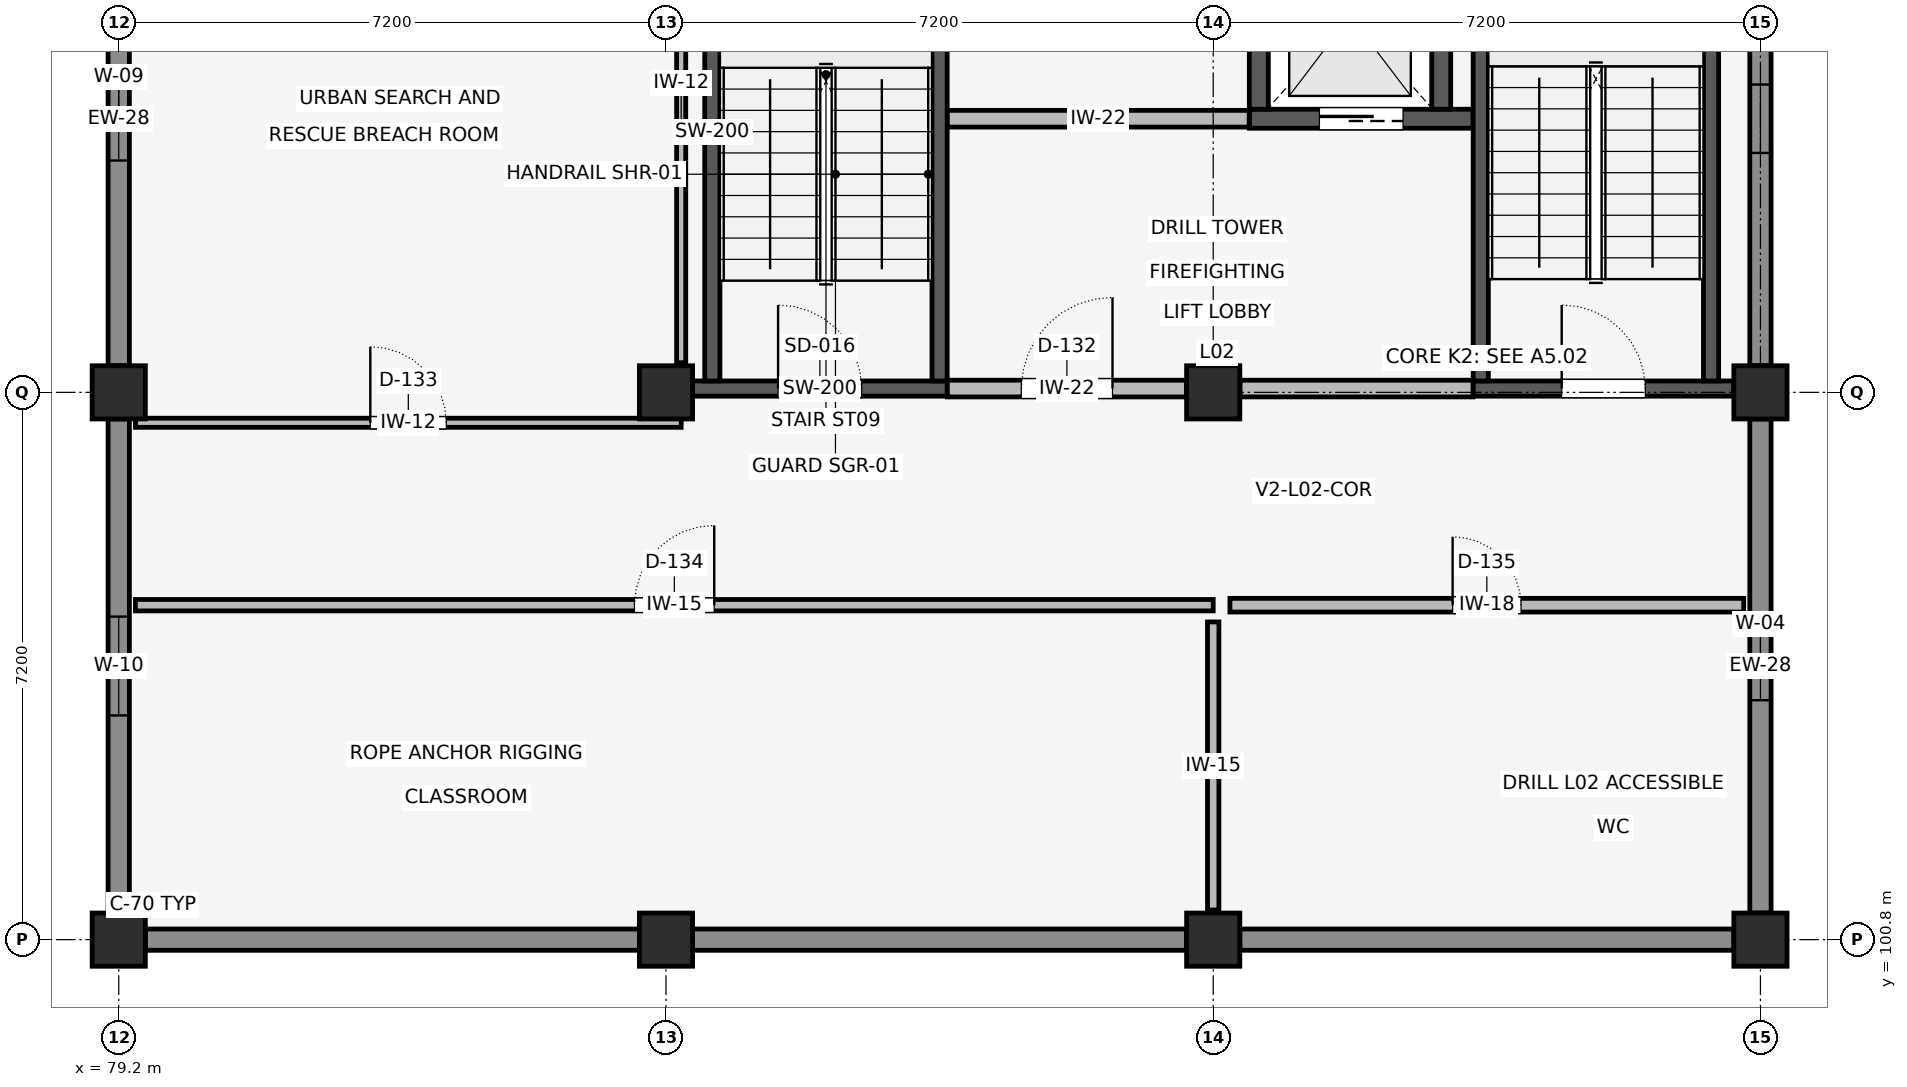
"""IFC4 building model, lengths in metres.
Left out: names, types, materials, properties, quantities, classifications, styles, units other than length and angle.
Written with IfcOpenShell. Run it as: python <this file> out.ifc"""

import sys

from ifc_helpers import new_model, si_unit, direction, frame, frame_2d, origin, origin_2d, place, context, subcontext, project, spatial, rectangle, extrude, element, fill, save


model = new_model("IFC4")
c1 = context("Model", 3, precision=1e-05, world=origin(), true_north=direction((0.0, 1.0)))
c2 = subcontext(c1, "Body", "Model", "MODEL_VIEW")
j1 = project(units=[si_unit("LENGTHUNIT", "METRE"), si_unit("PLANEANGLEUNIT", "RADIAN")], contexts=[c1])
p1 = place(None, origin())
s1 = spatial("IfcSite", under=j1, at=p1, CompositionType="ELEMENT")
p2 = place(p1, origin())
s2 = spatial("IfcBuilding", under=s1, at=p2, CompositionType="ELEMENT")
p3 = place(p2, frame((0.0, 0.0, 9.6)))
s3 = spatial("IfcBuildingStorey", under=s2, at=p3, CompositionType="ELEMENT", Elevation=9.6)
for number, where, z_axis, x_axis in (
    (1, (79.2, 100.8, 0.0), (0.0, 0.0, 1.0), (1.0, 0.0, 0.0)),
    (2, (79.2, 108.0, 0.0), (0.0, 0.0, 1.0), (1.0, 0.0, 0.0)),
    (3, (86.4, 100.8, 0.0), (0.0, 0.0, 1.0), (1.0, 0.0, 0.0)),
    (4, (86.4, 108.0, 0.0), (0.0, 0.0, 1.0), (1.0, 0.0, 0.0)),
    (5, (93.6, 100.8, 0.0), (0.0, 0.0, 1.0), (1.0, 0.0, 0.0)),
    (6, (93.6, 108.0, 0.0), (0.0, 0.0, 1.0), (1.0, 0.0, 0.0)),
    (7, (100.8, 100.8, 0.0), (0.0, 0.0, 1.0), (1.0, 0.0, 0.0)),
    (8, (100.8, 108.0, 0.0), (0.0, 0.0, 1.0), (1.0, 0.0, 0.0)),
):
    element("IfcColumn", number, at=place(p3, frame(where, z_axis=z_axis, x_axis=x_axis)), inside=s3, PredefinedType="COLUMN", context=c2, shape_type="SweptSolid", body=[
        extrude(rectangle(XDim=0.7, YDim=0.7, at=origin_2d()), origin(), (0.0, 0.0, 1.0), 3.9),
    ])
p4 = place(p3, frame((94.075, 111.6, 0.0), z_axis=(0.0, 0.0, 1.0), x_axis=(1.0, 0.0, 0.0)))
e9 = element("IfcWall", 9, at=p4, inside=s3, PredefinedType="SHEAR", context=c2, shape_type="SweptSolid", body=[
    extrude(rectangle(XDim=2.945, YDim=0.25, at=frame_2d((1.473, 0.0))), origin(), (0.0, 0.0, 1.0), 3.65),
])
p5 = place(p4, frame((0.923, 0.0, 0.0)))
e10 = element("IfcOpeningElement", 10, at=p5, cuts=e9, PredefinedType="OPENING", context=c2, shape_type="SweptSolid", body=[
    extrude(rectangle(XDim=1.1, YDim=2.15, at=frame_2d((0.55, 1.075))), frame((0.0, 0.137, 0.0), z_axis=(0.0, -1.0, 0.0), x_axis=(1.0, 0.0, 0.0)), (0.0, 0.0, 1.0), 0.274),
])
for number, where, z_axis, x_axis in (
    (11, (94.2, 111.725, 0.0), (0.0, 0.0, 1.0), (0.0, 1.0, 0.0)),
    (12, (96.6, 111.725, 0.0), (0.0, 0.0, 1.0), (0.0, 1.0, 0.0)),
):
    element("IfcWall", number, at=place(p3, frame(where, z_axis=z_axis, x_axis=x_axis)), inside=s3, PredefinedType="SHEAR", context=c2, shape_type="SweptSolid", body=[
        extrude(rectangle(XDim=2.45, YDim=0.25, at=frame_2d((1.225, 0.0))), origin(), (0.0, 0.0, 1.0), 3.65),
    ])
p6 = place(p3, frame((97.02, 108.05, 0.0), z_axis=(0.0, 0.0, 1.0), x_axis=(1.0, 0.0, 0.0)))
e13 = element("IfcWall", 13, at=p6, inside=s3, PredefinedType="SHEAR", context=c2, shape_type="SweptSolid", body=[
    extrude(rectangle(XDim=3.43, YDim=0.2, at=frame_2d((1.715, 0.0))), origin(), (0.0, 0.0, 1.0), 3.65),
])
p7 = place(p6, frame((1.165, 0.0, 0.0)))
e14 = element("IfcOpeningElement", 14, at=p7, cuts=e13, PredefinedType="OPENING", context=c2, shape_type="SweptSolid", body=[
    extrude(rectangle(XDim=1.1, YDim=2.15, at=frame_2d((0.55, 1.075))), frame((0.0, 0.112, 0.0), z_axis=(0.0, -1.0, 0.0), x_axis=(1.0, 0.0, 0.0)), (0.0, 0.0, 1.0), 0.224),
])
for number, where, z_axis, x_axis in (
    (15, (97.12, 108.15, 0.0), (0.0, 0.0, 1.0), (0.0, 1.0, 0.0)),
    (16, (100.15, 108.15, 0.0), (0.0, 0.0, 1.0), (0.0, 1.0, 0.0)),
):
    element("IfcWall", number, at=place(p3, frame(where, z_axis=z_axis, x_axis=x_axis)), inside=s3, PredefinedType="SHEAR", context=c2, shape_type="SweptSolid", body=[
        extrude(rectangle(XDim=6.6, YDim=0.2, at=frame_2d((3.3, 0.0))), origin(), (0.0, 0.0, 1.0), 3.65),
    ])
p8 = place(p3, frame((86.75, 108.05, 0.0), z_axis=(0.0, 0.0, 1.0), x_axis=(1.0, 0.0, 0.0)))
e17 = element("IfcWall", 17, at=p8, inside=s3, PredefinedType="SHEAR", context=c2, shape_type="SweptSolid", body=[
    extrude(rectangle(XDim=3.35, YDim=0.2, at=frame_2d((1.675, 0.0))), origin(), (0.0, 0.0, 1.0), 3.65),
])
p9 = place(p8, frame((1.125, 0.0, 0.0)))
e18 = element("IfcOpeningElement", 18, at=p9, cuts=e17, PredefinedType="OPENING", context=c2, shape_type="SweptSolid", body=[
    extrude(rectangle(XDim=1.1, YDim=2.15, at=frame_2d((0.55, 1.075))), frame((0.0, 0.112, 0.0), z_axis=(0.0, -1.0, 0.0), x_axis=(1.0, 0.0, 0.0)), (0.0, 0.0, 1.0), 0.224),
])
for number, where, z_axis, x_axis in (
    (19, (87.01, 108.15, 0.0), (0.0, 0.0, 1.0), (0.0, 1.0, 0.0)),
    (20, (90.0, 108.15, 0.0), (0.0, 0.0, 1.0), (0.0, 1.0, 0.0)),
):
    element("IfcWall", number, at=place(p3, frame(where, z_axis=z_axis, x_axis=x_axis)), inside=s3, PredefinedType="SHEAR", context=c2, shape_type="SweptSolid", body=[
        extrude(rectangle(XDim=6.56, YDim=0.2, at=frame_2d((3.28, 0.0))), origin(), (0.0, 0.0, 1.0), 3.65),
    ])
p10 = place(p3, frame((100.8, 101.15, 0.0), z_axis=(0.0, 0.0, 1.0), x_axis=(0.0, 1.0, 0.0)))
e21 = element("IfcWall", 21, at=p10, inside=s3, PredefinedType="ELEMENTEDWALL", context=c2, shape_type="SweptSolid", body=[
    extrude(rectangle(XDim=6.5, YDim=0.28, at=frame_2d((3.25, 0.0))), origin(), (0.0, 0.0, 1.0), 2.99),
])
p11 = place(p10, frame((2.8, 0.0, 0.8)))
e22 = element("IfcOpeningElement", 22, at=p11, cuts=e21, PredefinedType="OPENING", context=c2, shape_type="SweptSolid", body=[
    extrude(rectangle(XDim=0.9, YDim=2.0, at=frame_2d((0.45, 1.0))), frame((0.0, 0.152, 0.0), z_axis=(0.0, -1.0, 0.0), x_axis=(1.0, 0.0, 0.0)), (0.0, 0.0, 1.0), 0.304),
])
p12 = place(p3, frame((100.8, 108.35, 0.0), z_axis=(0.0, 0.0, 1.0), x_axis=(0.0, 1.0, 0.0)))
e23 = element("IfcWall", 23, at=p12, inside=s3, PredefinedType="ELEMENTEDWALL", context=c2, shape_type="SweptSolid", body=[
    extrude(rectangle(XDim=6.5, YDim=0.28, at=frame_2d((3.25, 0.0))), origin(), (0.0, 0.0, 1.0), 3.04),
])
p13 = place(p12, frame((2.8, 0.0, 0.8)))
e24 = element("IfcOpeningElement", 24, at=p13, cuts=e23, PredefinedType="OPENING", context=c2, shape_type="SweptSolid", body=[
    extrude(rectangle(XDim=0.9, YDim=2.0, at=frame_2d((0.45, 1.0))), frame((0.0, 0.152, 0.0), z_axis=(0.0, -1.0, 0.0), x_axis=(1.0, 0.0, 0.0)), (0.0, 0.0, 1.0), 0.304),
])
p14 = place(p3, frame((79.2, 114.85, 0.0), z_axis=(0.0, 0.0, 1.0), x_axis=(0.0, -1.0, 0.0)))
e25 = element("IfcWall", 25, at=p14, inside=s3, PredefinedType="ELEMENTEDWALL", context=c2, shape_type="SweptSolid", body=[
    extrude(rectangle(XDim=6.5, YDim=0.28, at=frame_2d((3.25, 0.0))), origin(), (0.0, 0.0, 1.0), 3.04),
])
p15 = place(p14, frame((2.7, 0.0, 0.85)))
e26 = element("IfcOpeningElement", 26, at=p15, cuts=e25, PredefinedType="OPENING", context=c2, shape_type="SweptSolid", body=[
    extrude(rectangle(XDim=1.1, YDim=1.75, at=frame_2d((0.55, 0.875))), frame((0.0, 0.152, 0.0), z_axis=(0.0, -1.0, 0.0), x_axis=(1.0, 0.0, 0.0)), (0.0, 0.0, 1.0), 0.304),
])
p16 = place(p3, frame((79.2, 107.65, 0.0), z_axis=(0.0, 0.0, 1.0), x_axis=(0.0, -1.0, 0.0)))
e27 = element("IfcWall", 27, at=p16, inside=s3, PredefinedType="ELEMENTEDWALL", context=c2, shape_type="SweptSolid", body=[
    extrude(rectangle(XDim=6.5, YDim=0.28, at=frame_2d((3.25, 0.0))), origin(), (0.0, 0.0, 1.0), 2.99),
])
p17 = place(p16, frame((2.6, 0.0, 0.85)))
e28 = element("IfcOpeningElement", 28, at=p17, cuts=e27, PredefinedType="OPENING", context=c2, shape_type="SweptSolid", body=[
    extrude(rectangle(XDim=1.3, YDim=1.85, at=frame_2d((0.65, 0.925))), frame((0.0, 0.152, 0.0), z_axis=(0.0, -1.0, 0.0), x_axis=(1.0, 0.0, 0.0)), (0.0, 0.0, 1.0), 0.304),
])
p18 = place(p3, frame((79.55, 100.8, 0.0), z_axis=(0.0, 0.0, 1.0), x_axis=(1.0, 0.0, 0.0)))
e29 = element("IfcWall", 29, at=p18, inside=s3, PredefinedType="ELEMENTEDWALL", context=c2, shape_type="SweptSolid", body=[
    extrude(rectangle(XDim=6.5, YDim=0.28, at=frame_2d((3.25, 0.0))), origin(), (0.0, 0.0, 1.0), 2.94),
])
p19 = place(p3, frame((86.75, 100.8, 0.0), z_axis=(0.0, 0.0, 1.0), x_axis=(1.0, 0.0, 0.0)))
e30 = element("IfcWall", 30, at=p19, inside=s3, PredefinedType="ELEMENTEDWALL", context=c2, shape_type="SweptSolid", body=[
    extrude(rectangle(XDim=6.5, YDim=0.28, at=frame_2d((3.25, 0.0))), origin(), (0.0, 0.0, 1.0), 2.89),
])
p20 = place(p3, frame((93.95, 100.8, 0.0), z_axis=(0.0, 0.0, 1.0), x_axis=(1.0, 0.0, 0.0)))
e31 = element("IfcWall", 31, at=p20, inside=s3, PredefinedType="ELEMENTEDWALL", context=c2, shape_type="SweptSolid", body=[
    extrude(rectangle(XDim=6.5, YDim=0.28, at=frame_2d((3.25, 0.0))), origin(), (0.0, 0.0, 1.0), 2.94),
])
p21 = place(p3, frame((90.102, 108.05, 0.0), z_axis=(0.0, 0.0, 1.0), x_axis=(1.0, 0.0, 0.0)))
e32 = element("IfcWall", 32, at=p21, inside=s3, PredefinedType="STANDARD", context=c2, shape_type="SweptSolid", body=[
    extrude(rectangle(XDim=3.146, YDim=0.22, at=frame_2d((1.573, 0.0))), origin(), (0.0, 0.0, 1.0), 3.62),
])
p22 = place(p21, frame((0.973, 0.0, 0.0)))
e33 = element("IfcOpeningElement", 33, at=p22, cuts=e32, PredefinedType="OPENING", context=c2, shape_type="SweptSolid", body=[
    extrude(rectangle(XDim=1.2, YDim=2.2, at=frame_2d((0.6, 1.1))), frame((0.0, 0.122, 0.0), z_axis=(0.0, -1.0, 0.0), x_axis=(1.0, 0.0, 0.0)), (0.0, 0.0, 1.0), 0.244),
])
p23 = place(p3, frame((93.952, 108.05, 0.0), z_axis=(0.0, 0.0, 1.0), x_axis=(1.0, 0.0, 0.0)))
e34 = element("IfcWall", 34, at=p23, inside=s3, PredefinedType="STANDARD", context=c2, shape_type="SweptSolid", body=[
    extrude(rectangle(XDim=3.066, YDim=0.22, at=frame_2d((1.533, 0.0))), origin(), (0.0, 0.0, 1.0), 3.62),
])
p24 = place(p3, frame((90.102, 111.6, 0.0), z_axis=(0.0, 0.0, 1.0), x_axis=(1.0, 0.0, 0.0)))
e35 = element("IfcWall", 35, at=p24, inside=s3, PredefinedType="STANDARD", context=c2, shape_type="SweptSolid", body=[
    extrude(rectangle(XDim=3.971, YDim=0.22, at=frame_2d((1.985, 0.0))), origin(), (0.0, 0.0, 1.0), 3.038),
])
p25 = place(p3, frame((79.42, 107.6, 0.0), z_axis=(0.0, 0.0, 1.0), x_axis=(1.0, 0.0, 0.0)))
e36 = element("IfcWall", 36, at=p25, inside=s3, PredefinedType="PARTITIONING", context=c2, shape_type="SweptSolid", body=[
    extrude(rectangle(XDim=7.18, YDim=0.12, at=frame_2d((3.59, 0.0))), origin(), (0.0, 0.0, 1.0), 2.988),
])
p26 = place(p25, frame((3.09, 0.0, 0.0)))
e37 = element("IfcOpeningElement", 37, at=p26, cuts=e36, PredefinedType="OPENING", context=c2, shape_type="SweptSolid", body=[
    extrude(rectangle(XDim=1.0, YDim=2.15, at=frame_2d((0.5, 1.075))), frame((0.0, 0.072, 0.0), z_axis=(0.0, -1.0, 0.0), x_axis=(1.0, 0.0, 0.0)), (0.0, 0.0, 1.0), 0.144),
])
p27 = place(p3, frame((86.6, 108.39, 0.0), z_axis=(0.0, 0.0, 1.0), x_axis=(0.0, 1.0, 0.0)))
e38 = element("IfcWall", 38, at=p27, inside=s3, PredefinedType="PARTITIONING", context=c2, shape_type="SweptSolid", body=[
    extrude(rectangle(XDim=6.26, YDim=0.12, at=frame_2d((3.13, 0.0))), origin(), (0.0, 0.0, 1.0), 3.038),
])
p28 = place(p3, frame((79.42, 105.2, 0.0), z_axis=(0.0, 0.0, 1.0), x_axis=(1.0, 0.0, 0.0)))
e39 = element("IfcWall", 39, at=p28, inside=s3, PredefinedType="STANDARD", context=c2, shape_type="SweptSolid", body=[
    extrude(rectangle(XDim=14.18, YDim=0.15, at=frame_2d((7.09, 0.0))), origin(), (0.0, 0.0, 1.0), 2.988),
])
p29 = place(p28, frame((6.565, 0.0, 0.0)))
e40 = element("IfcOpeningElement", 40, at=p29, cuts=e39, PredefinedType="OPENING", context=c2, shape_type="SweptSolid", body=[
    extrude(rectangle(XDim=1.05, YDim=2.15, at=frame_2d((0.525, 1.075))), frame((0.0, 0.087, 0.0), z_axis=(0.0, -1.0, 0.0), x_axis=(1.0, 0.0, 0.0)), (0.0, 0.0, 1.0), 0.174),
])
p30 = place(p3, frame((93.6, 101.19, 0.0), z_axis=(0.0, 0.0, 1.0), x_axis=(0.0, 1.0, 0.0)))
e41 = element("IfcWall", 41, at=p30, inside=s3, PredefinedType="STANDARD", context=c2, shape_type="SweptSolid", body=[
    extrude(rectangle(XDim=3.79, YDim=0.15, at=frame_2d((1.895, 0.0))), origin(), (0.0, 0.0, 1.0), 2.988),
])
p31 = place(p3, frame((93.82, 105.2, 0.0), z_axis=(0.0, 0.0, 1.0), x_axis=(1.0, 0.0, 0.0)))
e42 = element("IfcWall", 42, at=p31, inside=s3, PredefinedType="PLUMBINGWALL", context=c2, shape_type="SweptSolid", body=[
    extrude(rectangle(XDim=6.76, YDim=0.18, at=frame_2d((3.38, 0.0))), origin(), (0.0, 0.0, 1.0), 3.62),
])
p32 = place(p31, frame((2.93, 0.0, 0.0)))
e43 = element("IfcOpeningElement", 43, at=p32, cuts=e42, PredefinedType="OPENING", context=c2, shape_type="SweptSolid", body=[
    extrude(rectangle(XDim=0.9, YDim=2.1, at=frame_2d((0.45, 1.05))), frame((0.0, 0.102, 0.0), z_axis=(0.0, -1.0, 0.0), x_axis=(1.0, 0.0, 0.0)), (0.0, 0.0, 1.0), 0.204),
])
p33 = place(p11, origin())
e44 = element("IfcWindow", 44, at=p33, inside=s3, PartitioningType="SINGLE_PANEL", PredefinedType="WINDOW", context=c2, shape_type="SweptSolid", body=[
    extrude(rectangle(XDim=0.9, YDim=2.0, at=frame_2d((0.45, 1.0))), frame((0.0, 0.03, 0.0), z_axis=(0.0, -1.0, 0.0), x_axis=(1.0, 0.0, 0.0)), (0.0, 0.0, 1.0), 0.06),
])
fill(e22, e44)
p34 = place(p13, origin())
e45 = element("IfcWindow", 45, at=p34, inside=s3, PartitioningType="SINGLE_PANEL", PredefinedType="WINDOW", context=c2, shape_type="SweptSolid", body=[
    extrude(rectangle(XDim=0.9, YDim=2.0, at=frame_2d((0.45, 1.0))), frame((0.0, 0.03, 0.0), z_axis=(0.0, -1.0, 0.0), x_axis=(1.0, 0.0, 0.0)), (0.0, 0.0, 1.0), 0.06),
])
fill(e24, e45)
p35 = place(p15, origin())
e46 = element("IfcWindow", 46, at=p35, inside=s3, PartitioningType="SINGLE_PANEL", PredefinedType="WINDOW", context=c2, shape_type="SweptSolid", body=[
    extrude(rectangle(XDim=1.1, YDim=1.75, at=frame_2d((0.55, 0.875))), frame((0.0, 0.03, 0.0), z_axis=(0.0, -1.0, 0.0), x_axis=(1.0, 0.0, 0.0)), (0.0, 0.0, 1.0), 0.06),
])
fill(e26, e46)
p36 = place(p17, origin())
e47 = element("IfcWindow", 47, at=p36, inside=s3, PartitioningType="SINGLE_PANEL", PredefinedType="WINDOW", context=c2, shape_type="SweptSolid", body=[
    extrude(rectangle(XDim=1.3, YDim=1.85, at=frame_2d((0.65, 0.925))), frame((0.0, 0.03, 0.0), z_axis=(0.0, -1.0, 0.0), x_axis=(1.0, 0.0, 0.0)), (0.0, 0.0, 1.0), 0.06),
])
fill(e28, e47)
p37 = place(p7, origin())
e48 = element("IfcDoor", 48, at=p37, inside=s3, OperationType="SINGLE_SWING_LEFT", PredefinedType="DOOR", context=c2, shape_type="SweptSolid", body=[
    extrude(rectangle(XDim=1.1, YDim=2.15, at=frame_2d((0.55, 1.075))), frame((0.0, 0.025, 0.0), z_axis=(0.0, -1.0, 0.0), x_axis=(1.0, 0.0, 0.0)), (0.0, 0.0, 1.0), 0.05),
])
fill(e14, e48)
p38 = place(p9, origin())
e49 = element("IfcDoor", 49, at=p38, inside=s3, OperationType="SINGLE_SWING_LEFT", PredefinedType="DOOR", context=c2, shape_type="SweptSolid", body=[
    extrude(rectangle(XDim=1.1, YDim=2.15, at=frame_2d((0.55, 1.075))), frame((0.0, 0.025, 0.0), z_axis=(0.0, -1.0, 0.0), x_axis=(1.0, 0.0, 0.0)), (0.0, 0.0, 1.0), 0.05),
])
fill(e18, e49)
p39 = place(p5, origin())
e50 = element("IfcDoor", 50, at=p39, inside=s3, OperationType="SLIDING_TO_LEFT", PredefinedType="DOOR", context=c2, shape_type="SweptSolid", body=[
    extrude(rectangle(XDim=1.1, YDim=2.15, at=frame_2d((0.55, 1.075))), frame((0.0, 0.025, 0.0), z_axis=(0.0, -1.0, 0.0), x_axis=(1.0, 0.0, 0.0)), (0.0, 0.0, 1.0), 0.05),
])
fill(e10, e50)
p40 = place(p22, origin())
e51 = element("IfcDoor", 51, at=p40, inside=s3, OperationType="SINGLE_SWING_RIGHT", PredefinedType="DOOR", context=c2, shape_type="SweptSolid", body=[
    extrude(rectangle(XDim=1.2, YDim=2.2, at=frame_2d((0.6, 1.1))), frame((0.0, 0.025, 0.0), z_axis=(0.0, -1.0, 0.0), x_axis=(1.0, 0.0, 0.0)), (0.0, 0.0, 1.0), 0.05),
])
fill(e33, e51)
p41 = place(p26, origin())
e52 = element("IfcDoor", 52, at=p41, inside=s3, OperationType="SINGLE_SWING_LEFT", PredefinedType="DOOR", context=c2, shape_type="SweptSolid", body=[
    extrude(rectangle(XDim=1.0, YDim=2.15, at=frame_2d((0.5, 1.075))), frame((0.0, 0.025, 0.0), z_axis=(0.0, -1.0, 0.0), x_axis=(1.0, 0.0, 0.0)), (0.0, 0.0, 1.0), 0.05),
])
fill(e37, e52)
p42 = place(p29, origin())
e53 = element("IfcDoor", 53, at=p42, inside=s3, OperationType="SINGLE_SWING_RIGHT", PredefinedType="DOOR", context=c2, shape_type="SweptSolid", body=[
    extrude(rectangle(XDim=1.05, YDim=2.15, at=frame_2d((0.525, 1.075))), frame((0.0, 0.025, 0.0), z_axis=(0.0, -1.0, 0.0), x_axis=(1.0, 0.0, 0.0)), (0.0, 0.0, 1.0), 0.05),
])
fill(e40, e53)
p43 = place(p32, origin())
e54 = element("IfcDoor", 54, at=p43, inside=s3, OperationType="SINGLE_SWING_LEFT", PredefinedType="DOOR", context=c2, shape_type="SweptSolid", body=[
    extrude(rectangle(XDim=0.9, YDim=2.1, at=frame_2d((0.45, 1.05))), frame((0.0, 0.025, 0.0), z_axis=(0.0, -1.0, 0.0), x_axis=(1.0, 0.0, 0.0)), (0.0, 0.0, 1.0), 0.05),
])
fill(e43, e54)
save(model, sys.argv[1])
